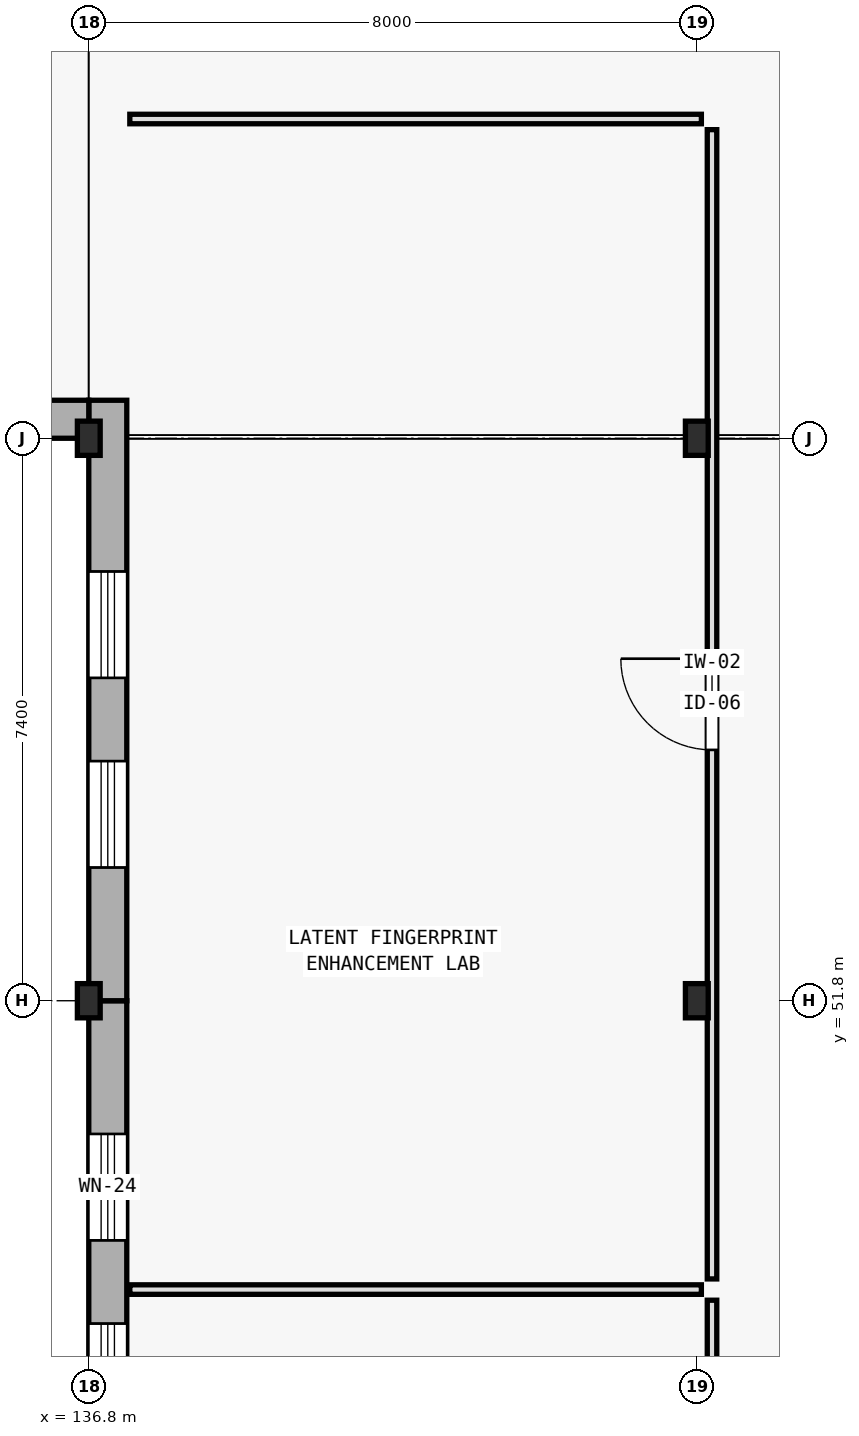
"""IFC4 building model, lengths in metres.
Left out: names, types, materials, properties, quantities, classifications, styles, units other than length and angle.
Written with IfcOpenShell. Run it as: python <this file> out.ifc"""

import sys

from ifc_helpers import new_model, si_unit, direction, frame, frame_2d, origin, origin_2d, place, context, subcontext, project, spatial, rectangle, i_section, extrude, element, fill, save


model = new_model("IFC4")
c1 = context("Model", 3, precision=1e-05, world=origin(), true_north=direction((0.0, 1.0)))
c2 = subcontext(c1, "Body", "Model", "MODEL_VIEW")
j1 = project(units=[si_unit("LENGTHUNIT", "METRE"), si_unit("PLANEANGLEUNIT", "RADIAN")], contexts=[c1])
p1 = place(None, origin())
s1 = spatial("IfcSite", under=j1, at=p1, CompositionType="ELEMENT")
p2 = place(p1, origin())
s2 = spatial("IfcBuilding", under=s1, at=p2, CompositionType="ELEMENT")
p3 = place(p2, frame((0.0, 0.0, 5.4)))
s3 = spatial("IfcBuildingStorey", under=s2, at=p3, CompositionType="ELEMENT", Elevation=5.4)
for number, where, z_axis, x_axis in (
    (1, (136.8, 51.8, 0.0), (0.0, 0.0, 1.0), (1.0, 0.0, 0.0)),
    (2, (136.8, 59.2, 0.0), (0.0, 0.0, 1.0), (1.0, 0.0, 0.0)),
    (3, (144.8, 51.8, 0.0), (0.0, 0.0, 1.0), (1.0, 0.0, 0.0)),
    (4, (144.8, 59.2, 0.0), (0.0, 0.0, 1.0), (1.0, 0.0, 0.0)),
):
    element("IfcColumn", number, at=place(p3, frame(where, z_axis=z_axis, x_axis=x_axis)), inside=s3, PredefinedType="COLUMN", context=c2, shape_type="SweptSolid", body=[
        extrude(i_section(OverallWidth=0.3, OverallDepth=0.45, WebThickness=0.014, FlangeThickness=0.026, FilletRadius=0.027, at=origin_2d()), origin(), (0.0, 0.0, 1.0), 4.5),
    ])
p4 = place(p3, frame((137.05, 44.4, 0.0), z_axis=(0.0, 0.0, 1.0), x_axis=(0.0, 1.0, 0.0)))
e5 = element("IfcWall", 5, at=p4, inside=s3, PredefinedType="STANDARD", context=c2, shape_type="SweptSolid", body=[
    extrude(rectangle(XDim=7.4, YDim=0.5, at=frame_2d((3.7, 0.0))), origin(), (0.0, 0.0, 1.0), 4.2),
])
p5 = place(p4, frame((1.753, 0.0, 0.9)))
e6 = element("IfcOpeningElement", 6, at=p5, cuts=e5, PredefinedType="OPENING", context=c2, shape_type="SweptSolid", body=[
    extrude(rectangle(XDim=1.4, YDim=1.75, at=frame_2d((0.7, 0.875))), frame((0.0, 0.26, 0.0), z_axis=(0.0, -1.0, 0.0), x_axis=(1.0, 0.0, 0.0)), (0.0, 0.0, 1.0), 0.52),
])
p6 = place(p4, frame((4.247, 0.0, 0.9)))
e7 = element("IfcOpeningElement", 7, at=p6, cuts=e5, PredefinedType="OPENING", context=c2, shape_type="SweptSolid", body=[
    extrude(rectangle(XDim=1.4, YDim=1.75, at=frame_2d((0.7, 0.875))), frame((0.0, 0.26, 0.0), z_axis=(0.0, -1.0, 0.0), x_axis=(1.0, 0.0, 0.0)), (0.0, 0.0, 1.0), 0.52),
])
p7 = place(p3, frame((137.05, 51.8, 0.0), z_axis=(0.0, 0.0, 1.0), x_axis=(0.0, 1.0, 0.0)))
e8 = element("IfcWall", 8, at=p7, inside=s3, PredefinedType="STANDARD", context=c2, shape_type="SweptSolid", body=[
    extrude(rectangle(XDim=7.9, YDim=0.5, at=frame_2d((3.95, 0.0))), origin(), (0.0, 0.0, 1.0), 4.2),
])
p8 = place(p7, frame((1.753, 0.0, 0.9)))
e9 = element("IfcOpeningElement", 9, at=p8, cuts=e8, PredefinedType="OPENING", context=c2, shape_type="SweptSolid", body=[
    extrude(rectangle(XDim=1.4, YDim=2.15, at=frame_2d((0.7, 1.075))), frame((0.0, 0.26, 0.0), z_axis=(0.0, -1.0, 0.0), x_axis=(1.0, 0.0, 0.0)), (0.0, 0.0, 1.0), 0.52),
])
p9 = place(p7, frame((4.247, 0.0, 0.9)))
e10 = element("IfcOpeningElement", 10, at=p9, cuts=e8, PredefinedType="OPENING", context=c2, shape_type="SweptSolid", body=[
    extrude(rectangle(XDim=1.4, YDim=2.15, at=frame_2d((0.7, 1.075))), frame((0.0, 0.26, 0.0), z_axis=(0.0, -1.0, 0.0), x_axis=(1.0, 0.0, 0.0)), (0.0, 0.0, 1.0), 0.52),
])
p10 = place(p3, frame((136.8, 59.45, 0.0), z_axis=(0.0, 0.0, 1.0), x_axis=(-1.0, 0.0, 0.0)))
e11 = element("IfcWall", 11, at=p10, inside=s3, PredefinedType="STANDARD", context=c2, shape_type="SweptSolid", body=[
    extrude(rectangle(XDim=8.0, YDim=0.5, at=frame_2d((4.0, 0.0))), origin(), (0.0, 0.0, 1.0), 4.24),
])
p11 = place(p10, frame((1.843, 0.0, 0.9)))
e12 = element("IfcOpeningElement", 12, at=p11, cuts=e11, PredefinedType="OPENING", context=c2, shape_type="SweptSolid", body=[
    extrude(rectangle(XDim=1.55, YDim=1.85, at=frame_2d((0.775, 0.925))), frame((0.0, 0.26, 0.0), z_axis=(0.0, -1.0, 0.0), x_axis=(1.0, 0.0, 0.0)), (0.0, 0.0, 1.0), 0.52),
])
p12 = place(p10, frame((4.607, 0.0, 0.9)))
e13 = element("IfcOpeningElement", 13, at=p12, cuts=e11, PredefinedType="OPENING", context=c2, shape_type="SweptSolid", body=[
    extrude(rectangle(XDim=1.55, YDim=1.85, at=frame_2d((0.775, 0.925))), frame((0.0, 0.26, 0.0), z_axis=(0.0, -1.0, 0.0), x_axis=(1.0, 0.0, 0.0)), (0.0, 0.0, 1.0), 0.52),
])
p13 = place(p3, frame((137.34, 48.0, 0.0), z_axis=(0.0, 0.0, 1.0), x_axis=(1.0, 0.0, 0.0)))
e14 = element("IfcWall", 14, at=p13, inside=s3, PredefinedType="PARTITIONING", context=c2, shape_type="SweptSolid", body=[
    extrude(rectangle(XDim=7.52, YDim=0.125, at=frame_2d((3.76, 0.0))), origin(), (0.0, 0.0, 1.0), 3.69),
])
p14 = place(p3, frame((145.0, 22.39, 0.0), z_axis=(0.0, 0.0, 1.0), x_axis=(0.0, 1.0, 0.0)))
e15 = element("IfcWall", 15, at=p14, inside=s3, PredefinedType="PARTITIONING", context=c2, shape_type="SweptSolid", body=[
    extrude(rectangle(XDim=25.47, YDim=0.125, at=frame_2d((12.735, 0.0))), origin(), (0.0, 0.0, 1.0), 3.6),
])
p15 = place(p14, frame((12.135, 0.0, 0.0)))
e16 = element("IfcOpeningElement", 16, at=p15, cuts=e15, PredefinedType="OPENING", context=c2, shape_type="SweptSolid", body=[
    extrude(rectangle(XDim=1.2, YDim=2.2, at=frame_2d((0.6, 1.1))), frame((0.0, 0.073, 0.0), z_axis=(0.0, -1.0, 0.0), x_axis=(1.0, 0.0, 0.0)), (0.0, 0.0, 1.0), 0.145),
])
p16 = place(p3, frame((137.34, 63.4, 0.0), z_axis=(0.0, 0.0, 1.0), x_axis=(1.0, 0.0, 0.0)))
e17 = element("IfcWall", 17, at=p16, inside=s3, PredefinedType="PARTITIONING", context=c2, shape_type="SweptSolid", body=[
    extrude(rectangle(XDim=7.52, YDim=0.125, at=frame_2d((3.76, 0.0))), origin(), (0.0, 0.0, 1.0), 3.69),
])
p17 = place(p3, frame((145.0, 48.14, 0.0), z_axis=(0.0, 0.0, 1.0), x_axis=(0.0, 1.0, 0.0)))
e18 = element("IfcWall", 18, at=p17, inside=s3, PredefinedType="PARTITIONING", context=c2, shape_type="SweptSolid", body=[
    extrude(rectangle(XDim=15.12, YDim=0.125, at=frame_2d((7.56, 0.0))), origin(), (0.0, 0.0, 1.0), 3.63),
])
p18 = place(p17, frame((6.96, 0.0, 0.0)))
e19 = element("IfcOpeningElement", 19, at=p18, cuts=e18, PredefinedType="OPENING", context=c2, shape_type="SweptSolid", body=[
    extrude(rectangle(XDim=1.2, YDim=2.2, at=frame_2d((0.6, 1.1))), frame((0.0, 0.073, 0.0), z_axis=(0.0, -1.0, 0.0), x_axis=(1.0, 0.0, 0.0)), (0.0, 0.0, 1.0), 0.145),
])
p19 = place(p5, origin())
e20 = element("IfcWindow", 20, at=p19, inside=s3, PartitioningType="SINGLE_PANEL", PredefinedType="WINDOW", context=c2, shape_type="SweptSolid", body=[
    extrude(rectangle(XDim=1.4, YDim=1.75, at=frame_2d((0.7, 0.875))), frame((0.0, 0.03, 0.0), z_axis=(0.0, -1.0, 0.0), x_axis=(1.0, 0.0, 0.0)), (0.0, 0.0, 1.0), 0.06),
])
fill(e6, e20)
p20 = place(p6, origin())
e21 = element("IfcWindow", 21, at=p20, inside=s3, PartitioningType="SINGLE_PANEL", PredefinedType="WINDOW", context=c2, shape_type="SweptSolid", body=[
    extrude(rectangle(XDim=1.4, YDim=1.75, at=frame_2d((0.7, 0.875))), frame((0.0, 0.03, 0.0), z_axis=(0.0, -1.0, 0.0), x_axis=(1.0, 0.0, 0.0)), (0.0, 0.0, 1.0), 0.06),
])
fill(e7, e21)
p21 = place(p8, origin())
e22 = element("IfcWindow", 22, at=p21, inside=s3, PartitioningType="SINGLE_PANEL", PredefinedType="WINDOW", context=c2, shape_type="SweptSolid", body=[
    extrude(rectangle(XDim=1.4, YDim=2.15, at=frame_2d((0.7, 1.075))), frame((0.0, 0.03, 0.0), z_axis=(0.0, -1.0, 0.0), x_axis=(1.0, 0.0, 0.0)), (0.0, 0.0, 1.0), 0.06),
])
fill(e9, e22)
p22 = place(p9, origin())
e23 = element("IfcWindow", 23, at=p22, inside=s3, PartitioningType="SINGLE_PANEL", PredefinedType="WINDOW", context=c2, shape_type="SweptSolid", body=[
    extrude(rectangle(XDim=1.4, YDim=2.15, at=frame_2d((0.7, 1.075))), frame((0.0, 0.03, 0.0), z_axis=(0.0, -1.0, 0.0), x_axis=(1.0, 0.0, 0.0)), (0.0, 0.0, 1.0), 0.06),
])
fill(e10, e23)
p23 = place(p18, origin())
e24 = element("IfcDoor", 24, at=p23, inside=s3, OperationType="SINGLE_SWING_RIGHT", PredefinedType="DOOR", context=c2, shape_type="SweptSolid", body=[
    extrude(rectangle(XDim=1.2, YDim=2.2, at=frame_2d((0.6, 1.1))), frame((0.0, 0.025, 0.0), z_axis=(0.0, -1.0, 0.0), x_axis=(1.0, 0.0, 0.0)), (0.0, 0.0, 1.0), 0.05),
])
fill(e19, e24)
save(model, sys.argv[1])
